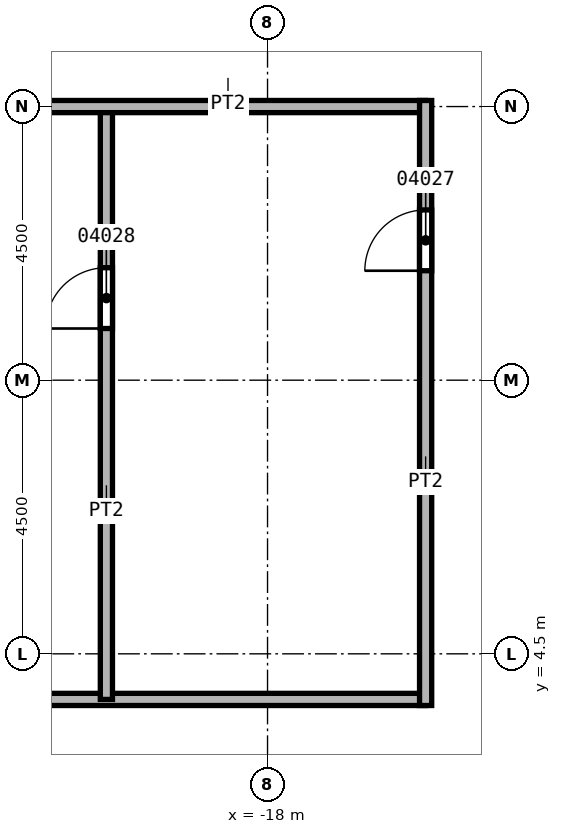
"""IFC4 building model, lengths in metres.
Left out: names, types, materials, properties, quantities, classifications, styles, units other than length and angle.
Written with IfcOpenShell. Run it as: python <this file> out.ifc"""

import sys

from ifc_helpers import new_model, si_unit, direction, frame, frame_2d, origin, place, context, subcontext, project, spatial, rectangle, extrude, element, fill, save


model = new_model("IFC4")
c1 = context("Model", 3, precision=1e-05, world=origin(), true_north=direction((0.0, 1.0)))
c2 = subcontext(c1, "Body", "Model", "MODEL_VIEW")
j1 = project(units=[si_unit("LENGTHUNIT", "METRE"), si_unit("PLANEANGLEUNIT", "RADIAN")], contexts=[c1])
p1 = place(None, origin())
s1 = spatial("IfcSite", under=j1, at=p1, CompositionType="ELEMENT")
p2 = place(p1, origin())
s2 = spatial("IfcBuilding", under=s1, at=p2, CompositionType="ELEMENT")
p3 = place(p2, frame((0.0, 0.0, 108.0)))
s3 = spatial("IfcBuildingStorey", under=s2, at=p3, CompositionType="ELEMENT", Elevation=108.0)
p4 = place(p3, frame((-33.85, 3.75, 0.0), z_axis=(0.0, 0.0, 1.0), x_axis=(1.0, 0.0, 0.0)))
e1 = element("IfcWall", 1, at=p4, inside=s3, PredefinedType="PARTITIONING", context=c2, shape_type="SweptSolid", body=[
    extrude(rectangle(XDim=18.45, YDim=0.2, at=frame_2d((9.225, 0.0))), origin(), (0.0, 0.0, 1.0), 3.7),
])
p5 = place(p3, frame((-20.65, 3.75, 0.0), z_axis=(0.0, 0.0, 1.0), x_axis=(0.0, 1.0, 0.0)))
e2 = element("IfcWall", 2, at=p5, inside=s3, PredefinedType="PARTITIONING", context=c2, shape_type="SweptSolid", body=[
    extrude(rectangle(XDim=9.75, YDim=0.2, at=frame_2d((4.875, 0.0))), origin(), (0.0, 0.0, 1.0), 3.7),
])
p6 = place(p5, frame((6.1, 0.0, 0.0)))
e3 = element("IfcOpeningElement", 3, at=p6, cuts=e2, PredefinedType="OPENING", context=c2, shape_type="SweptSolid", body=[
    extrude(rectangle(XDim=1.0, YDim=2.1, at=frame_2d((0.5, 1.05))), frame((0.0, 0.1, 0.0), z_axis=(0.0, -1.0, 0.0), x_axis=(1.0, 0.0, 0.0)), (0.0, 0.0, 1.0), 0.2),
])
p7 = place(p3, frame((-15.4, 13.5, 0.0), z_axis=(0.0, 0.0, 1.0), x_axis=(-1.0, 0.0, 0.0)))
e4 = element("IfcWall", 4, at=p7, inside=s3, PredefinedType="PARTITIONING", context=c2, shape_type="SweptSolid", body=[
    extrude(rectangle(XDim=6.6, YDim=0.2, at=frame_2d((3.3, 0.0))), origin(), (0.0, 0.0, 1.0), 3.7),
])
p8 = place(p3, frame((-15.4, 3.65, 0.0), z_axis=(0.0, 0.0, 1.0), x_axis=(0.0, 1.0, 0.0)))
e5 = element("IfcWall", 5, at=p8, inside=s3, PredefinedType="PARTITIONING", context=c2, shape_type="SweptSolid", body=[
    extrude(rectangle(XDim=9.95, YDim=0.2, at=frame_2d((4.975, 0.0))), origin(), (0.0, 0.0, 1.0), 3.7),
])
p9 = place(p8, frame((7.15, 0.0, 0.0)))
e6 = element("IfcOpeningElement", 6, at=p9, cuts=e5, PredefinedType="OPENING", context=c2, shape_type="SweptSolid", body=[
    extrude(rectangle(XDim=1.0, YDim=2.1, at=frame_2d((0.5, 1.05))), frame((0.0, 0.1, 0.0), z_axis=(0.0, -1.0, 0.0), x_axis=(1.0, 0.0, 0.0)), (0.0, 0.0, 1.0), 0.2),
])
p10 = place(p9, origin())
e7 = element("IfcDoor", 7, at=p10, inside=s3, OperationType="SINGLE_SWING_RIGHT", PredefinedType="DOOR", context=c2, shape_type="SweptSolid", body=[
    extrude(rectangle(XDim=1.0, YDim=2.1, at=frame_2d((0.5, 1.05))), frame((0.0, 0.025, 0.0), z_axis=(0.0, -1.0, 0.0), x_axis=(1.0, 0.0, 0.0)), (0.0, 0.0, 1.0), 0.05),
])
fill(e6, e7)
p11 = place(p6, origin())
e8 = element("IfcDoor", 8, at=p11, inside=s3, OperationType="SINGLE_SWING_LEFT", PredefinedType="DOOR", context=c2, shape_type="SweptSolid", body=[
    extrude(rectangle(XDim=1.0, YDim=2.1, at=frame_2d((0.5, 1.05))), frame((0.0, 0.025, 0.0), z_axis=(0.0, -1.0, 0.0), x_axis=(1.0, 0.0, 0.0)), (0.0, 0.0, 1.0), 0.05),
])
fill(e3, e8)
save(model, sys.argv[1])
